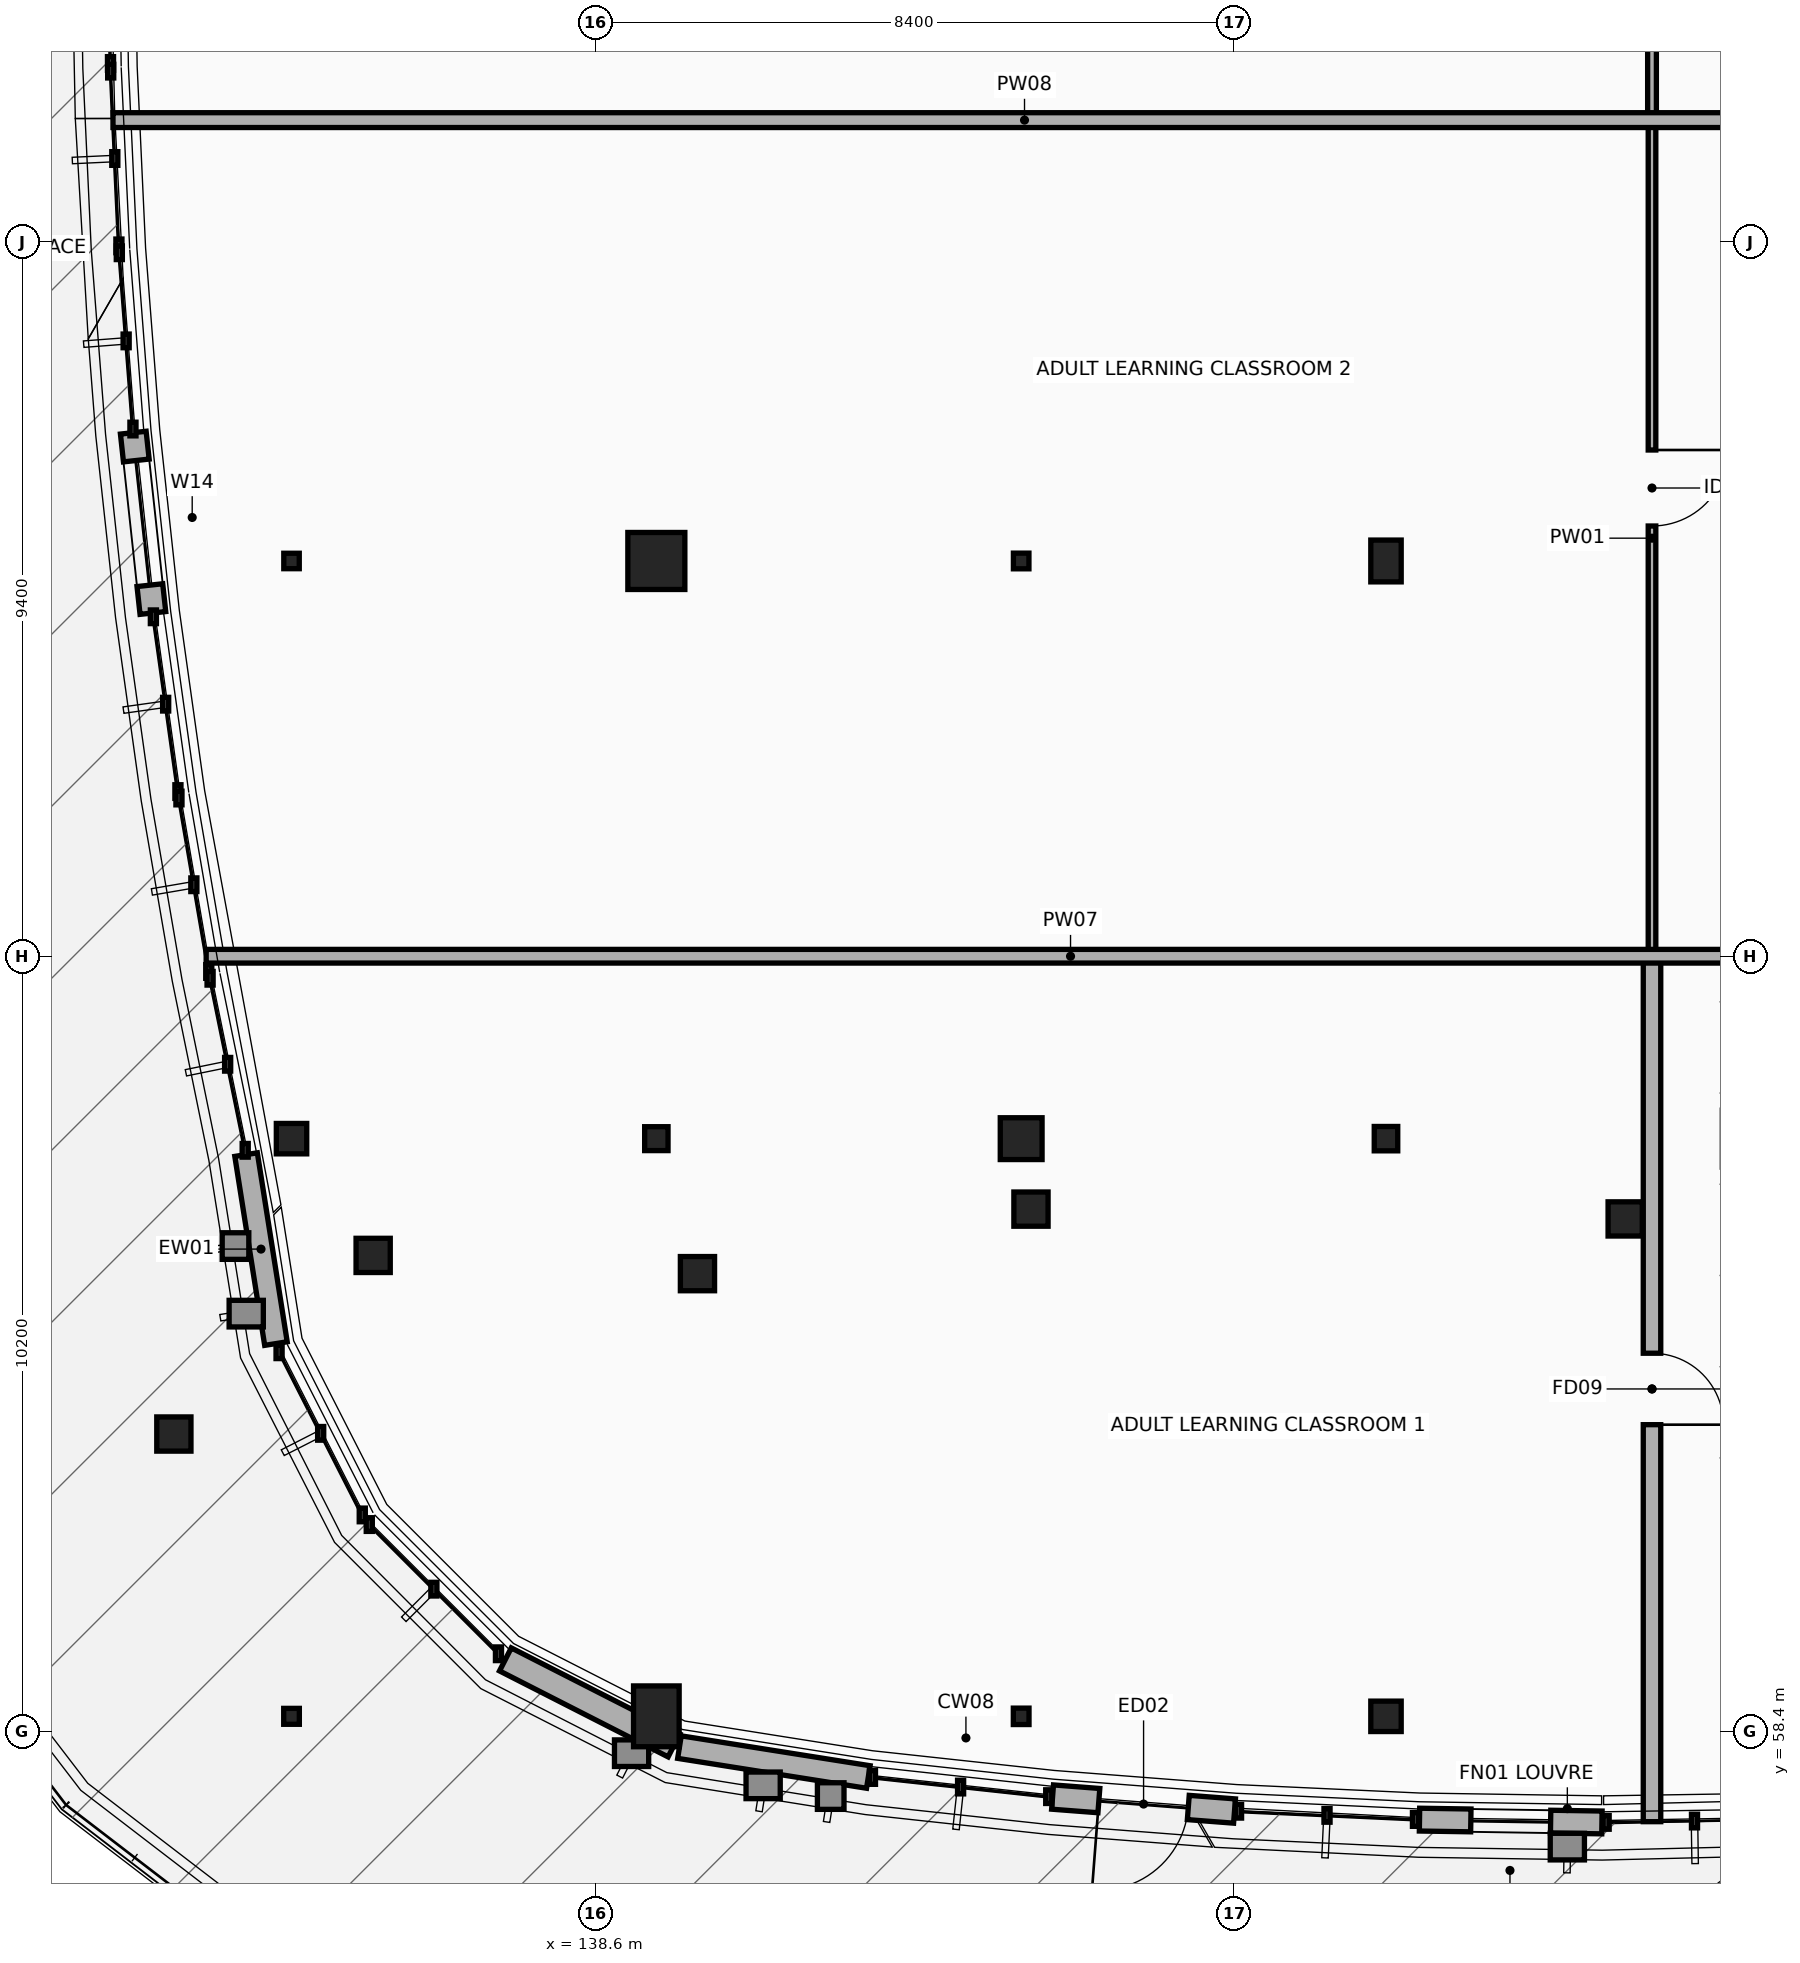
"""IFC4 building model, lengths in metres.
Left out: names, types, materials, properties, quantities, classifications, styles, units other than length and angle.
Written with IfcOpenShell. Run it as: python <this file> out.ifc"""

import sys

from ifc_helpers import new_model, si_unit, direction, frame, frame_2d, origin, origin_2d, place, context, subcontext, project, spatial, rectangle, circle, i_section, extrude, element, fill, save


model = new_model("IFC4")
c1 = context("Model", 3, precision=1e-05, world=origin(), true_north=direction((0.0, 1.0)))
c2 = subcontext(c1, "Body", "Model", "MODEL_VIEW")
j1 = project(units=[si_unit("LENGTHUNIT", "METRE"), si_unit("PLANEANGLEUNIT", "RADIAN")], contexts=[c1])
p1 = place(None, origin())
s1 = spatial("IfcSite", under=j1, at=p1, CompositionType="ELEMENT")
p2 = place(p1, origin())
s2 = spatial("IfcBuilding", under=s1, at=p2, CompositionType="ELEMENT")
p3 = place(p2, frame((0.0, 0.0, 4.8)))
s3 = spatial("IfcBuildingStorey", under=s2, at=p3, CompositionType="ELEMENT", Elevation=4.8)
p4 = place(p3, frame((134.6, 58.6, 0.0), z_axis=(0.0, 0.0, 1.0), x_axis=(1.0, 0.0, 0.0)))
e1 = element("IfcColumn", 1, at=p4, inside=s3, PredefinedType="COLUMN", context=c2, shape_type="SweptSolid", body=[
    extrude(i_section(OverallWidth=0.206, OverallDepth=0.21, WebThickness=0.01, FlangeThickness=0.014, at=origin_2d()), origin(), (0.0, 0.0, 1.0), 3.9),
])
p5 = place(p3, frame((134.6, 66.2, 0.0), z_axis=(0.0, 0.0, 1.0), x_axis=(1.0, 0.0, 0.0)))
e2 = element("IfcColumn", 2, at=p5, inside=s3, PredefinedType="COLUMN", context=c2, shape_type="SweptSolid", body=[
    extrude(rectangle(XDim=0.4, YDim=0.4, at=origin_2d()), origin(), (0.0, 0.0, 1.0), 3.9),
])
p6 = place(p3, frame((134.6, 73.8, 0.0), z_axis=(0.0, 0.0, 1.0), x_axis=(1.0, 0.0, 0.0)))
e3 = element("IfcColumn", 3, at=p6, inside=s3, PredefinedType="COLUMN", context=c2, shape_type="SweptSolid", body=[
    extrude(i_section(OverallWidth=0.204, OverallDepth=0.203, WebThickness=0.007, FlangeThickness=0.011, at=origin_2d()), origin(), (0.0, 0.0, 1.0), 3.9),
])
p7 = place(p3, frame((139.4, 58.6, 0.0), z_axis=(0.0, 0.0, 1.0), x_axis=(1.0, 0.0, 0.0)))
e4 = element("IfcColumn", 4, at=p7, inside=s3, PredefinedType="COLUMN", context=c2, shape_type="SweptSolid", body=[
    extrude(rectangle(XDim=0.6, YDim=0.8, at=origin_2d()), origin(), (0.0, 0.0, 1.0), 3.9),
])
p8 = place(p3, frame((139.4, 66.2, 0.0), z_axis=(0.0, 0.0, 1.0), x_axis=(1.0, 0.0, 0.0)))
e5 = element("IfcColumn", 5, at=p8, inside=s3, PredefinedType="COLUMN", context=c2, shape_type="SweptSolid", body=[
    extrude(i_section(OverallWidth=0.307, OverallDepth=0.314, WebThickness=0.012, FlangeThickness=0.019, at=origin_2d()), origin(), (0.0, 0.0, 1.0), 3.9),
])
p9 = place(p3, frame((139.4, 73.8, 0.0), z_axis=(0.0, 0.0, 1.0), x_axis=(1.0, 0.0, 0.0)))
e6 = element("IfcColumn", 6, at=p9, inside=s3, PredefinedType="COLUMN", context=c2, shape_type="SweptSolid", body=[
    extrude(rectangle(XDim=0.75, YDim=0.75, at=origin_2d()), origin(), (0.0, 0.0, 1.0), 3.9),
])
p10 = place(p3, frame((144.2, 58.6, 0.0), z_axis=(0.0, 0.0, 1.0), x_axis=(1.0, 0.0, 0.0)))
e7 = element("IfcColumn", 7, at=p10, inside=s3, PredefinedType="COLUMN", context=c2, shape_type="SweptSolid", body=[
    extrude(i_section(OverallWidth=0.206, OverallDepth=0.216, WebThickness=0.01, FlangeThickness=0.017, at=origin_2d()), origin(), (0.0, 0.0, 1.0), 3.9),
])
p11 = place(p3, frame((144.2, 66.2, 0.0), z_axis=(0.0, 0.0, 1.0), x_axis=(1.0, 0.0, 0.0)))
e8 = element("IfcColumn", 8, at=p11, inside=s3, PredefinedType="COLUMN", context=c2, shape_type="SweptSolid", body=[
    extrude(rectangle(XDim=0.55, YDim=0.55, at=origin_2d()), origin(), (0.0, 0.0, 1.0), 3.9),
])
p12 = place(p3, frame((144.2, 73.8, 0.0), z_axis=(0.0, 0.0, 1.0), x_axis=(1.0, 0.0, 0.0)))
e9 = element("IfcColumn", 9, at=p12, inside=s3, PredefinedType="COLUMN", context=c2, shape_type="SweptSolid", body=[
    extrude(i_section(OverallWidth=0.204, OverallDepth=0.206, WebThickness=0.008, FlangeThickness=0.012, at=origin_2d()), origin(), (0.0, 0.0, 1.0), 3.9),
])
p13 = place(p3, frame((149.0, 58.6, 0.0), z_axis=(0.0, 0.0, 1.0), x_axis=(1.0, 0.0, 0.0)))
e10 = element("IfcColumn", 10, at=p13, inside=s3, PredefinedType="COLUMN", context=c2, shape_type="SweptSolid", body=[
    extrude(rectangle(XDim=0.4, YDim=0.4, at=origin_2d()), origin(), (0.0, 0.0, 1.0), 3.9),
])
p14 = place(p3, frame((149.0, 66.2, 0.0), z_axis=(0.0, 0.0, 1.0), x_axis=(1.0, 0.0, 0.0)))
e11 = element("IfcColumn", 11, at=p14, inside=s3, PredefinedType="COLUMN", context=c2, shape_type="SweptSolid", body=[
    extrude(i_section(OverallWidth=0.309, OverallDepth=0.321, WebThickness=0.014, FlangeThickness=0.022, at=origin_2d()), origin(), (0.0, 0.0, 1.0), 3.9),
])
p15 = place(p3, frame((149.0, 73.8, 0.0), z_axis=(0.0, 0.0, 1.0), x_axis=(1.0, 0.0, 0.0)))
e12 = element("IfcColumn", 12, at=p15, inside=s3, PredefinedType="COLUMN", context=c2, shape_type="SweptSolid", body=[
    extrude(rectangle(XDim=0.4, YDim=0.55, at=origin_2d()), origin(), (0.0, 0.0, 1.0), 3.9),
])
p16 = place(p3, frame((135.674, 64.664, 0.0), z_axis=(0.0, 0.0, 1.0), x_axis=(1.0, 0.0, 0.0)))
e13 = element("IfcColumn", 13, at=p16, inside=s3, PredefinedType="COLUMN", context=c2, shape_type="SweptSolid", body=[
    extrude(rectangle(XDim=0.45, YDim=0.45, at=origin_2d()), origin(), (0.0, 0.0, 1.0), 3.653),
])
for number, where, z_axis, x_axis in (
    (14, (139.941, 64.424, 0.0), (0.0, 0.0, 1.0), (1.0, 0.0, 0.0)),
    (15, (144.329, 65.273, 0.0), (0.0, 0.0, 1.0), (1.0, 0.0, 0.0)),
    (16, (152.147, 65.144, 0.0), (0.0, 0.0, 1.0), (1.0, 0.0, 0.0)),
):
    element("IfcColumn", number, at=place(p3, frame(where, z_axis=z_axis, x_axis=x_axis)), inside=s3, PredefinedType="COLUMN", context=c2, shape_type="SweptSolid", body=[
        extrude(rectangle(XDim=0.45, YDim=0.45, at=origin_2d()), origin(), (0.0, 0.0, 1.0), 3.9),
    ])
p17 = place(p3, frame((133.052, 62.314, 0.0), z_axis=(0.0, 0.0, 1.0), x_axis=(1.0, 0.0, 0.0)))
e17 = element("IfcColumn", 17, at=p17, inside=s3, PredefinedType="COLUMN", context=c2, shape_type="SweptSolid", body=[
    extrude(circle(Radius=0.225, at=origin_2d()), origin(), (0.0, 0.0, 1.0), 3.704),
])
p18 = place(p3, frame((147.007, 57.354, 0.0), z_axis=(0.0, 0.0, 1.0), x_axis=(-0.997056877446, 0.076665397266, 0.0)))
e18 = element("IfcWall", 18, at=p18, inside=s3, PredefinedType="STANDARD", context=c2, shape_type="SweptSolid", body=[
    extrude(rectangle(XDim=2.401, YDim=0.32, at=frame_2d((1.201, 0.0))), origin(), (0.0, 0.0, 1.0), 3.637),
])
p19 = place(p18, frame((0.61, 0.0, 0.0)))
e19 = element("IfcOpeningElement", 19, at=p19, cuts=e18, PredefinedType="OPENING", context=c2, shape_type="SweptSolid", body=[
    extrude(rectangle(XDim=1.18, YDim=2.24, at=frame_2d((0.59, 1.12))), frame((0.0, 0.17, 0.0), z_axis=(0.0, -1.0, 0.0), x_axis=(1.0, 0.0, 0.0)), (0.0, 0.0, 1.0), 0.34),
])
p20 = place(p3, frame((151.841, 57.204, 0.0), z_axis=(0.0, 0.0, 1.0), x_axis=(-0.999882062567, 0.01535776538, 0.0)))
e20 = element("IfcWall", 20, at=p20, inside=s3, PredefinedType="STANDARD", context=c2, shape_type="SweptSolid", body=[
    extrude(rectangle(XDim=2.4, YDim=0.3, at=frame_2d((1.2, 0.0))), origin(), (0.0, 0.0, 1.0), 3.637),
])
p21 = place(p20, frame((0.675, 0.0, 0.9)))
e21 = element("IfcOpeningElement", 21, at=p21, cuts=e20, PredefinedType="OPENING", context=c2, shape_type="SweptSolid", body=[
    extrude(rectangle(XDim=1.05, YDim=1.65, at=frame_2d((0.525, 0.825))), frame((0.0, 0.16, 0.0), z_axis=(0.0, -1.0, 0.0), x_axis=(1.0, 0.0, 0.0)), (0.0, 0.0, 1.0), 0.32),
])
p22 = place(p3, frame((132.776, 73.116, 0.0), z_axis=(0.0, 0.0, 1.0), x_axis=(-0.108050387228, 0.99414541885, 0.0)))
e22 = element("IfcWall", 22, at=p22, inside=s3, PredefinedType="STANDARD", context=c2, shape_type="SweptSolid", body=[
    extrude(rectangle(XDim=2.386, YDim=0.34, at=frame_2d((1.193, 0.0))), origin(), (0.0, 0.0, 1.0), 3.637),
])
p23 = place(p22, frame((0.368, 0.0, 0.9)))
e23 = element("IfcOpeningElement", 23, at=p23, cuts=e22, PredefinedType="OPENING", context=c2, shape_type="SweptSolid", body=[
    extrude(rectangle(XDim=1.65, YDim=1.8, at=frame_2d((0.825, 0.9))), frame((0.0, 0.18, 0.0), z_axis=(0.0, -1.0, 0.0), x_axis=(1.0, 0.0, 0.0)), (0.0, 0.0, 1.0), 0.36),
])
p24 = place(p3, frame((134.395, 63.504, 0.0), z_axis=(0.0, 0.0, 1.0), x_axis=(-0.156166790267, 0.987730698935, 0.0)))
e24 = element("IfcWall", 24, at=p24, inside=s3, PredefinedType="STANDARD", context=c2, shape_type="SweptSolid", body=[
    extrude(rectangle(XDim=2.517, YDim=0.3, at=frame_2d((1.258, 0.0))), origin(), (0.0, 0.0, 1.0), 2.937),
])
p25 = place(p3, frame((139.632, 58.218, 0.0), z_axis=(0.0, 0.0, 1.0), x_axis=(-0.890849346376, 0.454298846644, 0.0)))
e25 = element("IfcWall", 25, at=p25, inside=s3, PredefinedType="STANDARD", context=c2, shape_type="SweptSolid", body=[
    extrude(rectangle(XDim=2.49, YDim=0.34, at=frame_2d((1.245, 0.0))), origin(), (0.0, 0.0, 1.0), 3.249),
])
p26 = place(p3, frame((142.189, 57.802, 0.0), z_axis=(0.0, 0.0, 1.0), x_axis=(-0.987718862461, 0.15624163574, 0.0)))
e26 = element("IfcWall", 26, at=p26, inside=s3, PredefinedType="STANDARD", context=c2, shape_type="SweptSolid", body=[
    extrude(rectangle(XDim=2.516, YDim=0.3, at=frame_2d((1.258, 0.0))), origin(), (0.0, 0.0, 1.0), 3.637),
])
p27 = place(p3, frame((152.5, 68.6, 0.0), z_axis=(0.0, 0.0, 1.0), x_axis=(0.0, -1.0, 0.0)))
e27 = element("IfcWall", 27, at=p27, inside=s3, PredefinedType="PARTITIONING", context=c2, shape_type="SweptSolid", body=[
    extrude(rectangle(XDim=11.386, YDim=0.23, at=frame_2d((5.693, 0.0))), origin(), (0.0, 0.0, 1.0), 2.838),
])
p28 = place(p27, frame((5.223, 0.0, 0.0)))
e28 = element("IfcOpeningElement", 28, at=p28, cuts=e27, PredefinedType="OPENING", context=c2, shape_type="SweptSolid", body=[
    extrude(rectangle(XDim=0.94, YDim=2.1, at=frame_2d((0.47, 1.05))), frame((0.0, 0.125, 0.0), z_axis=(0.0, -1.0, 0.0), x_axis=(1.0, 0.0, 0.0)), (0.0, 0.0, 1.0), 0.25),
])
p29 = place(p3, frame((152.5, 79.6, 0.0), z_axis=(0.0, 0.0, 1.0), x_axis=(0.0, -1.0, 0.0)))
e29 = element("IfcWall", 29, at=p29, inside=s3, PredefinedType="PARTITIONING", context=c2, shape_type="SweptSolid", body=[
    extrude(rectangle(XDim=11.0, YDim=0.1, at=frame_2d((5.5, 0.0))), origin(), (0.0, 0.0, 1.0), 3.075),
])
p30 = place(p29, frame((4.34, 0.0, 0.0)))
e30 = element("IfcOpeningElement", 30, at=p30, cuts=e29, PredefinedType="OPENING", context=c2, shape_type="SweptSolid", body=[
    extrude(rectangle(XDim=1.0, YDim=2.12, at=frame_2d((0.5, 1.06))), frame((0.0, 0.06, 0.0), z_axis=(0.0, -1.0, 0.0), x_axis=(1.0, 0.0, 0.0)), (0.0, 0.0, 1.0), 0.12),
])
p31 = place(p3, frame((152.5, 90.6, 0.0), z_axis=(0.0, 0.0, 1.0), x_axis=(0.0, -1.0, 0.0)))
e31 = element("IfcWall", 31, at=p31, inside=s3, PredefinedType="PARTITIONING", context=c2, shape_type="SweptSolid", body=[
    extrude(rectangle(XDim=11.0, YDim=0.115, at=frame_2d((5.5, 0.0))), origin(), (0.0, 0.0, 1.0), 3.061),
])
p32 = place(p31, frame((4.81, 0.0, 0.0)))
e32 = element("IfcOpeningElement", 32, at=p32, cuts=e31, PredefinedType="OPENING", context=c2, shape_type="SweptSolid", body=[
    extrude(rectangle(XDim=1.38, YDim=2.2, at=frame_2d((0.69, 1.1))), frame((0.0, 0.067, 0.0), z_axis=(0.0, -1.0, 0.0), x_axis=(1.0, 0.0, 0.0)), (0.0, 0.0, 1.0), 0.135),
])
p33 = place(p3, frame((133.477, 68.6, 0.0), z_axis=(0.0, 0.0, 1.0), x_axis=(1.0, 0.0, 0.0)))
e33 = element("IfcWall", 33, at=p33, inside=s3, PredefinedType="PARTITIONING", context=c2, shape_type="SweptSolid", body=[
    extrude(rectangle(XDim=22.745, YDim=0.18, at=frame_2d((11.373, 0.0))), origin(), (0.0, 0.0, 1.0), 2.863),
])
p34 = place(p3, frame((132.251, 79.6, 0.0), z_axis=(0.0, 0.0, 1.0), x_axis=(1.0, 0.0, 0.0)))
e34 = element("IfcWall", 34, at=p34, inside=s3, PredefinedType="PARTITIONING", context=c2, shape_type="SweptSolid", body=[
    extrude(rectangle(XDim=23.986, YDim=0.195, at=frame_2d((11.993, 0.0))), origin(), (0.0, 0.0, 1.0), 2.992),
])
p35 = place(p19, origin())
e35 = element("IfcDoor", 35, at=p35, inside=s3, OperationType="SINGLE_SWING_RIGHT", PredefinedType="DOOR", context=c2, shape_type="SweptSolid", body=[
    extrude(rectangle(XDim=1.18, YDim=2.24, at=frame_2d((0.59, 1.12))), frame((0.0, 0.025, 0.0), z_axis=(0.0, -1.0, 0.0), x_axis=(1.0, 0.0, 0.0)), (0.0, 0.0, 1.0), 0.05),
])
fill(e19, e35)
p36 = place(p21, origin())
e36 = element("IfcWindow", 36, at=p36, inside=s3, PartitioningType="SINGLE_PANEL", PredefinedType="WINDOW", context=c2, shape_type="SweptSolid", body=[
    extrude(rectangle(XDim=1.05, YDim=1.65, at=frame_2d((0.525, 0.825))), frame((0.0, 0.03, 0.0), z_axis=(0.0, -1.0, 0.0), x_axis=(1.0, 0.0, 0.0)), (0.0, 0.0, 1.0), 0.06),
])
fill(e21, e36)
p37 = place(p23, origin())
e37 = element("IfcWindow", 37, at=p37, inside=s3, PartitioningType="SINGLE_PANEL", PredefinedType="WINDOW", context=c2, shape_type="SweptSolid", body=[
    extrude(rectangle(XDim=1.65, YDim=1.8, at=frame_2d((0.825, 0.9))), frame((0.0, 0.03, 0.0), z_axis=(0.0, -1.0, 0.0), x_axis=(1.0, 0.0, 0.0)), (0.0, 0.0, 1.0), 0.06),
])
fill(e23, e37)
p38 = place(p28, origin())
e38 = element("IfcDoor", 38, at=p38, inside=s3, OperationType="SINGLE_SWING_RIGHT", PredefinedType="DOOR", context=c2, shape_type="SweptSolid", body=[
    extrude(rectangle(XDim=0.94, YDim=2.1, at=frame_2d((0.47, 1.05))), frame((0.0, 0.025, 0.0), z_axis=(0.0, -1.0, 0.0), x_axis=(1.0, 0.0, 0.0)), (0.0, 0.0, 1.0), 0.05),
])
fill(e28, e38)
p39 = place(p30, origin())
e39 = element("IfcDoor", 39, at=p39, inside=s3, OperationType="SINGLE_SWING_LEFT", PredefinedType="DOOR", context=c2, shape_type="SweptSolid", body=[
    extrude(rectangle(XDim=1.0, YDim=2.12, at=frame_2d((0.5, 1.06))), frame((0.0, 0.025, 0.0), z_axis=(0.0, -1.0, 0.0), x_axis=(1.0, 0.0, 0.0)), (0.0, 0.0, 1.0), 0.05),
])
fill(e30, e39)
save(model, sys.argv[1])
